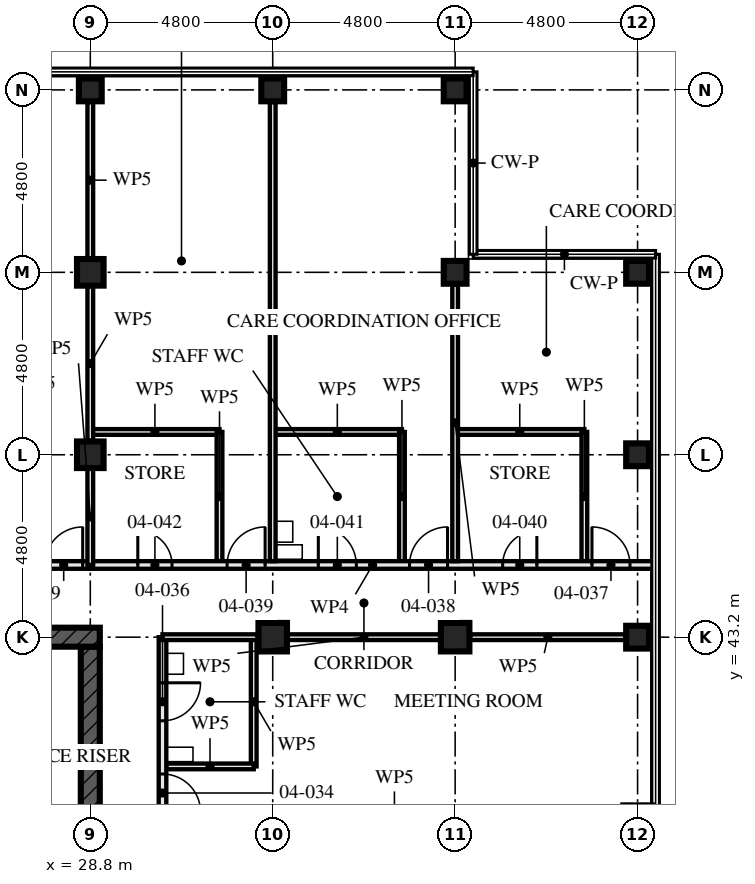
"""IFC4 building model, lengths in metres.
Left out: names, types, materials, properties, quantities, classifications, styles, units other than length and angle.
Written with IfcOpenShell. Run it as: python <this file> out.ifc"""

import sys

from ifc_helpers import new_model, si_unit, direction, frame, frame_2d, origin, origin_2d, place, context, subcontext, project, spatial, rectangle, hollow_rectangle, extrude, element, fill, save


model = new_model("IFC4")
c1 = context("Model", 3, precision=1e-05, world=origin(), true_north=direction((0.0, 1.0)))
c2 = subcontext(c1, "Body", "Model", "MODEL_VIEW")
j1 = project(units=[si_unit("LENGTHUNIT", "METRE"), si_unit("PLANEANGLEUNIT", "RADIAN")], contexts=[c1])
p1 = place(None, origin())
s1 = spatial("IfcSite", under=j1, at=p1, CompositionType="ELEMENT")
p2 = place(p1, origin())
s2 = spatial("IfcBuilding", under=s1, at=p2, CompositionType="ELEMENT")
p3 = place(p2, frame((0.0, 0.0, 18.0)))
s3 = spatial("IfcBuildingStorey", under=s2, at=p3, CompositionType="ELEMENT", Elevation=18.0)
for number, where, z_axis, x_axis in (
    (1, (28.8, 48.0, 0.0), (0.0, 0.0, 1.0), (1.0, 0.0, 0.0)),
    (2, (28.8, 52.8, 0.0), (0.0, 0.0, 1.0), (1.0, 0.0, 0.0)),
):
    element("IfcColumn", number, at=place(p3, frame(where, z_axis=z_axis, x_axis=x_axis)), inside=s3, PredefinedType="COLUMN", context=c2, shape_type="SweptSolid", body=[
        extrude(hollow_rectangle(XDim=0.7, YDim=0.7, WallThickness=0.06, at=origin_2d()), origin(), (0.0, 0.0, 1.0), 4.5),
    ])
p4 = place(p3, frame((28.8, 57.6, 0.0), z_axis=(0.0, 0.0, 1.0), x_axis=(0.0, 1.0, 0.0)))
e3 = element("IfcColumn", 3, at=p4, inside=s3, PredefinedType="COLUMN", context=c2, shape_type="SweptSolid", body=[
    extrude(hollow_rectangle(XDim=0.6, YDim=0.6, WallThickness=0.08, at=origin_2d()), origin(), (0.0, 0.0, 1.0), 4.5),
])
p5 = place(p3, frame((33.6, 43.2, 0.0), z_axis=(0.0, 0.0, 1.0), x_axis=(0.0, 1.0, 0.0)))
e4 = element("IfcColumn", 4, at=p5, inside=s3, PredefinedType="COLUMN", context=c2, shape_type="SweptSolid", body=[
    extrude(hollow_rectangle(XDim=0.75, YDim=0.75, WallThickness=0.08, at=origin_2d()), origin(), (0.0, 0.0, 1.0), 4.5),
])
p6 = place(p3, frame((33.6, 57.6, 0.0), z_axis=(0.0, 0.0, 1.0), x_axis=(0.0, 1.0, 0.0)))
e5 = element("IfcColumn", 5, at=p6, inside=s3, PredefinedType="COLUMN", context=c2, shape_type="SweptSolid", body=[
    extrude(hollow_rectangle(XDim=0.6, YDim=0.6, WallThickness=0.08, at=origin_2d()), origin(), (0.0, 0.0, 1.0), 4.5),
])
p7 = place(p3, frame((38.4, 43.2, 0.0), z_axis=(0.0, 0.0, 1.0), x_axis=(0.0, 1.0, 0.0)))
e6 = element("IfcColumn", 6, at=p7, inside=s3, PredefinedType="COLUMN", context=c2, shape_type="SweptSolid", body=[
    extrude(hollow_rectangle(XDim=0.75, YDim=0.75, WallThickness=0.08, at=origin_2d()), origin(), (0.0, 0.0, 1.0), 4.5),
])
for number, where, z_axis, x_axis in (
    (7, (38.4, 52.8, 0.0), (0.0, 0.0, 1.0), (0.0, 1.0, 0.0)),
    (8, (38.4, 57.6, 0.0), (0.0, 0.0, 1.0), (0.0, 1.0, 0.0)),
):
    element("IfcColumn", number, at=place(p3, frame(where, z_axis=z_axis, x_axis=x_axis)), inside=s3, PredefinedType="COLUMN", context=c2, shape_type="SweptSolid", body=[
        extrude(hollow_rectangle(XDim=0.6, YDim=0.6, WallThickness=0.06, at=origin_2d()), origin(), (0.0, 0.0, 1.0), 4.5),
    ])
for number, where, z_axis, x_axis in (
    (9, (43.2, 43.2, 0.0), (0.0, 0.0, 1.0), (0.0, 1.0, 0.0)),
    (10, (43.2, 48.0, 0.0), (0.0, 0.0, 1.0), (1.0, 0.0, 0.0)),
):
    element("IfcColumn", number, at=place(p3, frame(where, z_axis=z_axis, x_axis=x_axis)), inside=s3, PredefinedType="COLUMN", context=c2, shape_type="SweptSolid", body=[
        extrude(hollow_rectangle(XDim=0.6, YDim=0.6, WallThickness=0.08, at=origin_2d()), origin(), (0.0, 0.0, 1.0), 4.5),
    ])
p8 = place(p3, frame((43.2, 52.8, 0.0), z_axis=(0.0, 0.0, 1.0), x_axis=(0.0, 1.0, 0.0)))
e11 = element("IfcColumn", 11, at=p8, inside=s3, PredefinedType="COLUMN", context=c2, shape_type="SweptSolid", body=[
    extrude(hollow_rectangle(XDim=0.6, YDim=0.6, WallThickness=0.06, at=origin_2d()), origin(), (0.0, 0.0, 1.0), 4.5),
])
p9 = place(p3, frame((29.05, 43.2, -0.17), z_axis=(0.0, 0.0, 1.0), x_axis=(-1.0, 0.0, 0.0)))
e12 = element("IfcWall", 12, at=p9, inside=s3, PredefinedType="SHEAR", context=c2, shape_type="SweptSolid", body=[
    extrude(rectangle(XDim=14.9, YDim=0.5, at=frame_2d((7.45, 0.0))), origin(), (0.0, 0.0, 1.0), 4.5),
])
p10 = place(p9, frame((6.85, 0.0, 0.17)))
e13 = element("IfcOpeningElement", 13, at=p10, cuts=e12, PredefinedType="OPENING", context=c2, shape_type="SweptSolid", body=[
    extrude(rectangle(XDim=1.2, YDim=2.1, at=frame_2d((0.6, 1.05))), frame((0.0, 0.26, 0.0), z_axis=(0.0, -1.0, 0.0), x_axis=(1.0, 0.0, 0.0)), (0.0, 0.0, 1.0), 0.521),
])
p11 = place(p3, frame((28.8, 29.05, -0.17), z_axis=(0.0, 0.0, 1.0), x_axis=(0.0, 1.0, 0.0)))
e14 = element("IfcWall", 14, at=p11, inside=s3, PredefinedType="SHEAR", context=c2, shape_type="SweptSolid", body=[
    extrude(rectangle(XDim=13.9, YDim=0.5, at=frame_2d((6.95, 0.0))), origin(), (0.0, 0.0, 1.0), 4.5),
])
p12 = place(p11, frame((6.35, 0.0, 0.17)))
e15 = element("IfcOpeningElement", 15, at=p12, cuts=e14, PredefinedType="OPENING", context=c2, shape_type="SweptSolid", body=[
    extrude(rectangle(XDim=1.2, YDim=2.1, at=frame_2d((0.6, 1.05))), frame((0.0, 0.26, 0.0), z_axis=(0.0, -1.0, 0.0), x_axis=(1.0, 0.0, 0.0)), (0.0, 0.0, 1.0), 0.521),
])
p13 = place(p3, frame((28.8, 45.1, 0.0), z_axis=(0.0, 0.0, 1.0), x_axis=(-1.0, 0.0, 0.0)))
e16 = element("IfcWall", 16, at=p13, inside=s3, PredefinedType="PARTITIONING", context=c2, shape_type="SweptSolid", body=[
    extrude(rectangle(XDim=14.4, YDim=0.2, at=frame_2d((7.2, 0.0))), origin(), (0.0, 0.0, 1.0), 4.33),
])
p14 = place(p13, frame((0.2, 0.0, 0.0)))
e17 = element("IfcOpeningElement", 17, at=p14, cuts=e16, PredefinedType="OPENING", context=c2, shape_type="SweptSolid", body=[
    extrude(rectangle(XDim=1.0, YDim=2.4, at=frame_2d((0.5, 1.2))), frame((0.0, 0.111, 0.0), z_axis=(0.0, -1.0, 0.0), x_axis=(1.0, 0.0, 0.0)), (0.0, 0.0, 1.0), 0.221),
])
p15 = place(p13, frame((5.0, 0.0, 0.0)))
e18 = element("IfcOpeningElement", 18, at=p15, cuts=e16, PredefinedType="OPENING", context=c2, shape_type="SweptSolid", body=[
    extrude(rectangle(XDim=1.0, YDim=2.4, at=frame_2d((0.5, 1.2))), frame((0.0, 0.111, 0.0), z_axis=(0.0, -1.0, 0.0), x_axis=(1.0, 0.0, 0.0)), (0.0, 0.0, 1.0), 0.221),
])
p16 = place(p13, frame((9.8, 0.0, 0.0)))
e19 = element("IfcOpeningElement", 19, at=p16, cuts=e16, PredefinedType="OPENING", context=c2, shape_type="SweptSolid", body=[
    extrude(rectangle(XDim=1.0, YDim=2.4, at=frame_2d((0.5, 1.2))), frame((0.0, 0.111, 0.0), z_axis=(0.0, -1.0, 0.0), x_axis=(1.0, 0.0, 0.0)), (0.0, 0.0, 1.0), 0.221),
])
p17 = place(p13, frame((2.65, 0.0, 0.0)))
e20 = element("IfcOpeningElement", 20, at=p17, cuts=e16, PredefinedType="OPENING", context=c2, shape_type="SweptSolid", body=[
    extrude(rectangle(XDim=0.9, YDim=2.1, at=frame_2d((0.45, 1.05))), frame((0.0, 0.111, 0.0), z_axis=(0.0, -1.0, 0.0), x_axis=(1.0, 0.0, 0.0)), (0.0, 0.0, 1.0), 0.221),
])
p18 = place(p13, frame((7.4, 0.0, 0.0)))
e21 = element("IfcOpeningElement", 21, at=p18, cuts=e16, PredefinedType="OPENING", context=c2, shape_type="SweptSolid", body=[
    extrude(rectangle(XDim=1.0, YDim=2.1, at=frame_2d((0.5, 1.05))), frame((0.0, 0.111, 0.0), z_axis=(0.0, -1.0, 0.0), x_axis=(1.0, 0.0, 0.0)), (0.0, 0.0, 1.0), 0.221),
])
p19 = place(p13, frame((12.25, 0.0, 0.0)))
e22 = element("IfcOpeningElement", 22, at=p19, cuts=e16, PredefinedType="OPENING", context=c2, shape_type="SweptSolid", body=[
    extrude(rectangle(XDim=0.9, YDim=2.1, at=frame_2d((0.45, 1.05))), frame((0.0, 0.111, 0.0), z_axis=(0.0, -1.0, 0.0), x_axis=(1.0, 0.0, 0.0)), (0.0, 0.0, 1.0), 0.221),
])
p20 = place(p3, frame((33.1, 39.8, 0.0), z_axis=(0.0, 0.0, 1.0), x_axis=(-1.0, 0.0, 0.0)))
e23 = element("IfcWall", 23, at=p20, inside=s3, PredefinedType="PARTITIONING", context=c2, shape_type="SweptSolid", body=[
    extrude(rectangle(XDim=2.3, YDim=0.15, at=frame_2d((1.15, 0.0))), origin(), (0.0, 0.0, 1.0), 4.33),
])
p21 = place(p3, frame((33.1, 39.8, 0.0), z_axis=(0.0, 0.0, 1.0), x_axis=(0.0, 1.0, 0.0)))
e24 = element("IfcWall", 24, at=p21, inside=s3, PredefinedType="PARTITIONING", context=c2, shape_type="SweptSolid", body=[
    extrude(rectangle(XDim=3.4, YDim=0.15, at=frame_2d((1.7, 0.0))), origin(), (0.0, 0.0, 1.0), 4.33),
])
p22 = place(p3, frame((30.7, 28.8, 0.0), z_axis=(0.0, 0.0, 1.0), x_axis=(0.0, 1.0, 0.0)))
e25 = element("IfcWall", 25, at=p22, inside=s3, PredefinedType="PARTITIONING", context=c2, shape_type="SweptSolid", body=[
    extrude(rectangle(XDim=14.4, YDim=0.2, at=frame_2d((7.2, 0.0))), origin(), (0.0, 0.0, 1.0), 3.55),
])
p23 = place(p22, frame((1.4, 0.0, 0.0)))
e26 = element("IfcOpeningElement", 26, at=p23, cuts=e25, PredefinedType="OPENING", context=c2, shape_type="SweptSolid", body=[
    extrude(rectangle(XDim=1.0, YDim=2.1, at=frame_2d((0.5, 1.05))), frame((0.0, 0.111, 0.0), z_axis=(0.0, -1.0, 0.0), x_axis=(1.0, 0.0, 0.0)), (0.0, 0.0, 1.0), 0.221),
])
p24 = place(p22, frame((3.6, 0.0, 0.0)))
e27 = element("IfcOpeningElement", 27, at=p24, cuts=e25, PredefinedType="OPENING", context=c2, shape_type="SweptSolid", body=[
    extrude(rectangle(XDim=1.0, YDim=2.4, at=frame_2d((0.5, 1.2))), frame((0.0, 0.111, 0.0), z_axis=(0.0, -1.0, 0.0), x_axis=(1.0, 0.0, 0.0)), (0.0, 0.0, 1.0), 0.221),
])
p25 = place(p22, frame((5.0, 0.0, 0.0)))
e28 = element("IfcOpeningElement", 28, at=p25, cuts=e25, PredefinedType="OPENING", context=c2, shape_type="SweptSolid", body=[
    extrude(rectangle(XDim=1.0, YDim=2.4, at=frame_2d((0.5, 1.2))), frame((0.0, 0.111, 0.0), z_axis=(0.0, -1.0, 0.0), x_axis=(1.0, 0.0, 0.0)), (0.0, 0.0, 1.0), 0.221),
])
p26 = place(p22, frame((9.8, 0.0, 0.0)))
e29 = element("IfcOpeningElement", 29, at=p26, cuts=e25, PredefinedType="OPENING", context=c2, shape_type="SweptSolid", body=[
    extrude(rectangle(XDim=1.0, YDim=2.4, at=frame_2d((0.5, 1.2))), frame((0.0, 0.111, 0.0), z_axis=(0.0, -1.0, 0.0), x_axis=(1.0, 0.0, 0.0)), (0.0, 0.0, 1.0), 0.221),
])
p27 = place(p22, frame((7.45, 0.0, 0.0)))
e30 = element("IfcOpeningElement", 30, at=p27, cuts=e25, PredefinedType="OPENING", context=c2, shape_type="SweptSolid", body=[
    extrude(rectangle(XDim=0.9, YDim=2.1, at=frame_2d((0.45, 1.05))), frame((0.0, 0.111, 0.0), z_axis=(0.0, -1.0, 0.0), x_axis=(1.0, 0.0, 0.0)), (0.0, 0.0, 1.0), 0.221),
])
p28 = place(p22, frame((12.2, 0.0, 0.0)))
e31 = element("IfcOpeningElement", 31, at=p28, cuts=e25, PredefinedType="OPENING", context=c2, shape_type="SweptSolid", body=[
    extrude(rectangle(XDim=1.0, YDim=2.1, at=frame_2d((0.5, 1.05))), frame((0.0, 0.111, 0.0), z_axis=(0.0, -1.0, 0.0), x_axis=(1.0, 0.0, 0.0)), (0.0, 0.0, 1.0), 0.221),
])
p29 = place(p3, frame((41.8, 48.6, 0.0), z_axis=(0.0, 0.0, 1.0), x_axis=(0.0, -1.0, 0.0)))
e32 = element("IfcWall", 32, at=p29, inside=s3, PredefinedType="PARTITIONING", context=c2, shape_type="SweptSolid", body=[
    extrude(rectangle(XDim=3.4, YDim=0.15, at=frame_2d((1.7, 0.0))), origin(), (0.0, 0.0, 1.0), 3.55),
])
p30 = place(p3, frame((41.8, 48.6, 0.0), z_axis=(0.0, 0.0, 1.0), x_axis=(-1.0, 0.0, 0.0)))
e33 = element("IfcWall", 33, at=p30, inside=s3, PredefinedType="PARTITIONING", context=c2, shape_type="SweptSolid", body=[
    extrude(rectangle(XDim=3.4, YDim=0.15, at=frame_2d((1.7, 0.0))), origin(), (0.0, 0.0, 1.0), 4.33),
])
p31 = place(p3, frame((37.0, 48.6, 0.0), z_axis=(0.0, 0.0, 1.0), x_axis=(0.0, -1.0, 0.0)))
e34 = element("IfcWall", 34, at=p31, inside=s3, PredefinedType="PARTITIONING", context=c2, shape_type="SweptSolid", body=[
    extrude(rectangle(XDim=3.4, YDim=0.15, at=frame_2d((1.7, 0.0))), origin(), (0.0, 0.0, 1.0), 3.55),
])
p32 = place(p3, frame((37.0, 48.6, 0.0), z_axis=(0.0, 0.0, 1.0), x_axis=(-1.0, 0.0, 0.0)))
e35 = element("IfcWall", 35, at=p32, inside=s3, PredefinedType="PARTITIONING", context=c2, shape_type="SweptSolid", body=[
    extrude(rectangle(XDim=3.4, YDim=0.15, at=frame_2d((1.7, 0.0))), origin(), (0.0, 0.0, 1.0), 4.33),
])
p33 = place(p3, frame((32.2, 48.6, 0.0), z_axis=(0.0, 0.0, 1.0), x_axis=(0.0, -1.0, 0.0)))
e36 = element("IfcWall", 36, at=p33, inside=s3, PredefinedType="PARTITIONING", context=c2, shape_type="SweptSolid", body=[
    extrude(rectangle(XDim=3.4, YDim=0.15, at=frame_2d((1.7, 0.0))), origin(), (0.0, 0.0, 1.0), 3.55),
])
p34 = place(p3, frame((32.2, 48.6, 0.0), z_axis=(0.0, 0.0, 1.0), x_axis=(-1.0, 0.0, 0.0)))
e37 = element("IfcWall", 37, at=p34, inside=s3, PredefinedType="PARTITIONING", context=c2, shape_type="SweptSolid", body=[
    extrude(rectangle(XDim=3.4, YDim=0.15, at=frame_2d((1.7, 0.0))), origin(), (0.0, 0.0, 1.0), 4.33),
])
p35 = place(p3, frame((38.4, 52.48, 0.0), z_axis=(0.0, 0.0, 1.0), x_axis=(0.0, -1.0, 0.0)))
e38 = element("IfcWall", 38, at=p35, inside=s3, PredefinedType="PARTITIONING", context=c2, shape_type="SweptSolid", body=[
    extrude(rectangle(XDim=7.28, YDim=0.15, at=frame_2d((3.64, 0.0))), origin(), (0.0, 0.0, 1.0), 3.55),
])
p36 = place(p3, frame((33.6, 57.28, 0.0), z_axis=(0.0, 0.0, 1.0), x_axis=(0.0, -1.0, 0.0)))
e39 = element("IfcWall", 39, at=p36, inside=s3, PredefinedType="PARTITIONING", context=c2, shape_type="SweptSolid", body=[
    extrude(rectangle(XDim=12.08, YDim=0.15, at=frame_2d((6.04, 0.0))), origin(), (0.0, 0.0, 1.0), 3.55),
])
p37 = place(p3, frame((43.655, 45.1, 0.0), z_axis=(0.0, 0.0, 1.0), x_axis=(-1.0, 0.0, 0.0)))
e40 = element("IfcWall", 40, at=p37, inside=s3, PredefinedType="PARTITIONING", context=c2, shape_type="SweptSolid", body=[
    extrude(rectangle(XDim=14.855, YDim=0.2, at=frame_2d((7.427, 0.0))), origin(), (0.0, 0.0, 1.0), 3.32),
])
p38 = place(p37, frame((0.655, 0.0, 0.0)))
e41 = element("IfcOpeningElement", 41, at=p38, cuts=e40, PredefinedType="OPENING", context=c2, shape_type="SweptSolid", body=[
    extrude(rectangle(XDim=1.0, YDim=2.4, at=frame_2d((0.5, 1.2))), frame((0.0, 0.111, 0.0), z_axis=(0.0, -1.0, 0.0), x_axis=(1.0, 0.0, 0.0)), (0.0, 0.0, 1.0), 0.221),
])
p39 = place(p37, frame((5.455, 0.0, 0.0)))
e42 = element("IfcOpeningElement", 42, at=p39, cuts=e40, PredefinedType="OPENING", context=c2, shape_type="SweptSolid", body=[
    extrude(rectangle(XDim=1.0, YDim=2.4, at=frame_2d((0.5, 1.2))), frame((0.0, 0.111, 0.0), z_axis=(0.0, -1.0, 0.0), x_axis=(1.0, 0.0, 0.0)), (0.0, 0.0, 1.0), 0.221),
])
p40 = place(p37, frame((10.255, 0.0, 0.0)))
e43 = element("IfcOpeningElement", 43, at=p40, cuts=e40, PredefinedType="OPENING", context=c2, shape_type="SweptSolid", body=[
    extrude(rectangle(XDim=1.0, YDim=2.4, at=frame_2d((0.5, 1.2))), frame((0.0, 0.111, 0.0), z_axis=(0.0, -1.0, 0.0), x_axis=(1.0, 0.0, 0.0)), (0.0, 0.0, 1.0), 0.221),
])
p41 = place(p37, frame((3.105, 0.0, 0.0)))
e44 = element("IfcOpeningElement", 44, at=p41, cuts=e40, PredefinedType="OPENING", context=c2, shape_type="SweptSolid", body=[
    extrude(rectangle(XDim=0.9, YDim=2.1, at=frame_2d((0.45, 1.05))), frame((0.0, 0.111, 0.0), z_axis=(0.0, -1.0, 0.0), x_axis=(1.0, 0.0, 0.0)), (0.0, 0.0, 1.0), 0.221),
])
p42 = place(p37, frame((7.855, 0.0, 0.0)))
e45 = element("IfcOpeningElement", 45, at=p42, cuts=e40, PredefinedType="OPENING", context=c2, shape_type="SweptSolid", body=[
    extrude(rectangle(XDim=1.0, YDim=2.1, at=frame_2d((0.5, 1.05))), frame((0.0, 0.111, 0.0), z_axis=(0.0, -1.0, 0.0), x_axis=(1.0, 0.0, 0.0)), (0.0, 0.0, 1.0), 0.221),
])
p43 = place(p37, frame((12.705, 0.0, 0.0)))
e46 = element("IfcOpeningElement", 46, at=p43, cuts=e40, PredefinedType="OPENING", context=c2, shape_type="SweptSolid", body=[
    extrude(rectangle(XDim=0.9, YDim=2.1, at=frame_2d((0.45, 1.05))), frame((0.0, 0.111, 0.0), z_axis=(0.0, -1.0, 0.0), x_axis=(1.0, 0.0, 0.0)), (0.0, 0.0, 1.0), 0.221),
])
p44 = place(p3, frame((28.8, 45.1, 0.0), z_axis=(0.0, 0.0, 1.0), x_axis=(0.0, 1.0, 0.0)))
e47 = element("IfcWall", 47, at=p44, inside=s3, PredefinedType="PARTITIONING", context=c2, shape_type="SweptSolid", body=[
    extrude(rectangle(XDim=2.53, YDim=0.15, at=frame_2d((1.265, 0.0))), origin(), (0.0, 0.0, 1.0), 3.32),
])
p45 = place(p3, frame((28.8, 48.37, 0.0), z_axis=(0.0, 0.0, 1.0), x_axis=(0.0, 1.0, 0.0)))
e48 = element("IfcWall", 48, at=p45, inside=s3, PredefinedType="PARTITIONING", context=c2, shape_type="SweptSolid", body=[
    extrude(rectangle(XDim=4.06, YDim=0.15, at=frame_2d((2.03, 0.0))), origin(), (0.0, 0.0, 1.0), 3.32),
])
p46 = place(p3, frame((28.8, 53.17, 0.0), z_axis=(0.0, 0.0, 1.0), x_axis=(0.0, 1.0, 0.0)))
e49 = element("IfcWall", 49, at=p46, inside=s3, PredefinedType="PARTITIONING", context=c2, shape_type="SweptSolid", body=[
    extrude(rectangle(XDim=4.11, YDim=0.15, at=frame_2d((2.055, 0.0))), origin(), (0.0, 0.0, 1.0), 3.32),
])
p47 = place(p3, frame((42.88, 43.2, 0.0), z_axis=(0.0, 0.0, 1.0), x_axis=(-1.0, 0.0, 0.0)))
e50 = element("IfcWall", 50, at=p47, inside=s3, PredefinedType="PARTITIONING", context=c2, shape_type="SweptSolid", body=[
    extrude(rectangle(XDim=4.085, YDim=0.15, at=frame_2d((2.042, 0.0))), origin(), (0.0, 0.0, 1.0), 3.32),
])
p48 = place(p3, frame((38.005, 43.2, 0.0), z_axis=(0.0, 0.0, 1.0), x_axis=(-1.0, 0.0, 0.0)))
e51 = element("IfcWall", 51, at=p48, inside=s3, PredefinedType="PARTITIONING", context=c2, shape_type="SweptSolid", body=[
    extrude(rectangle(XDim=4.01, YDim=0.15, at=frame_2d((2.005, 0.0))), origin(), (0.0, 0.0, 1.0), 3.32),
])
p49 = place(p3, frame((33.205, 43.2, 0.0), z_axis=(0.0, 0.0, 1.0), x_axis=(-1.0, 0.0, 0.0)))
e52 = element("IfcWall", 52, at=p49, inside=s3, PredefinedType="PARTITIONING", context=c2, shape_type="SweptSolid", body=[
    extrude(rectangle(XDim=2.505, YDim=0.15, at=frame_2d((1.252, 0.0))), origin(), (0.0, 0.0, 1.0), 3.32),
])
p50 = place(p14, frame((1.0, 0.0, 0.0), z_axis=(0.0, 0.0, 1.0), x_axis=(-1.0, 0.0, 0.0)))
e53 = element("IfcDoor", 53, at=p50, inside=s3, OperationType="SINGLE_SWING_LEFT", PredefinedType="DOOR", context=c2, shape_type="SweptSolid", body=[
    extrude(rectangle(XDim=1.0, YDim=2.4, at=frame_2d((0.5, 1.2))), frame((0.0, 0.027, 0.0), z_axis=(0.0, -1.0, 0.0), x_axis=(1.0, 0.0, 0.0)), (0.0, 0.0, 1.0), 0.054),
])
fill(e17, e53)
p51 = place(p26, frame((1.0, 0.0, 0.0), z_axis=(0.0, 0.0, 1.0), x_axis=(-1.0, 0.0, 0.0)))
e54 = element("IfcDoor", 54, at=p51, inside=s3, OperationType="SINGLE_SWING_LEFT", PredefinedType="DOOR", context=c2, shape_type="SweptSolid", body=[
    extrude(rectangle(XDim=1.0, YDim=2.4, at=frame_2d((0.5, 1.2))), frame((0.0, 0.027, 0.0), z_axis=(0.0, -1.0, 0.0), x_axis=(1.0, 0.0, 0.0)), (0.0, 0.0, 1.0), 0.054),
])
fill(e29, e54)
p52 = place(p28, frame((1.0, 0.0, 0.0), z_axis=(0.0, 0.0, 1.0), x_axis=(-1.0, 0.0, 0.0)))
e55 = element("IfcDoor", 55, at=p52, inside=s3, OperationType="SINGLE_SWING_RIGHT", PredefinedType="DOOR", context=c2, shape_type="SweptSolid", body=[
    extrude(rectangle(XDim=1.0, YDim=2.1, at=frame_2d((0.5, 1.05))), frame((0.0, 0.027, 0.0), z_axis=(0.0, -1.0, 0.0), x_axis=(1.0, 0.0, 0.0)), (0.0, 0.0, 1.0), 0.054),
])
fill(e31, e55)
p53 = place(p38, frame((1.0, 0.0, 0.0), z_axis=(0.0, 0.0, 1.0), x_axis=(-1.0, 0.0, 0.0)))
e56 = element("IfcDoor", 56, at=p53, inside=s3, OperationType="SINGLE_SWING_RIGHT", PredefinedType="DOOR", context=c2, shape_type="SweptSolid", body=[
    extrude(rectangle(XDim=1.0, YDim=2.4, at=frame_2d((0.5, 1.2))), frame((0.0, 0.027, 0.0), z_axis=(0.0, -1.0, 0.0), x_axis=(1.0, 0.0, 0.0)), (0.0, 0.0, 1.0), 0.054),
])
fill(e41, e56)
p54 = place(p39, frame((1.0, 0.0, 0.0), z_axis=(0.0, 0.0, 1.0), x_axis=(-1.0, 0.0, 0.0)))
e57 = element("IfcDoor", 57, at=p54, inside=s3, OperationType="SINGLE_SWING_LEFT", PredefinedType="DOOR", context=c2, shape_type="SweptSolid", body=[
    extrude(rectangle(XDim=1.0, YDim=2.4, at=frame_2d((0.5, 1.2))), frame((0.0, 0.027, 0.0), z_axis=(0.0, -1.0, 0.0), x_axis=(1.0, 0.0, 0.0)), (0.0, 0.0, 1.0), 0.054),
])
fill(e42, e57)
p55 = place(p40, frame((1.0, 0.0, 0.0), z_axis=(0.0, 0.0, 1.0), x_axis=(-1.0, 0.0, 0.0)))
e58 = element("IfcDoor", 58, at=p55, inside=s3, OperationType="SINGLE_SWING_LEFT", PredefinedType="DOOR", context=c2, shape_type="SweptSolid", body=[
    extrude(rectangle(XDim=1.0, YDim=2.4, at=frame_2d((0.5, 1.2))), frame((0.0, 0.027, 0.0), z_axis=(0.0, -1.0, 0.0), x_axis=(1.0, 0.0, 0.0)), (0.0, 0.0, 1.0), 0.054),
])
fill(e43, e58)
p56 = place(p41, frame((0.9, 0.0, 0.0), z_axis=(0.0, 0.0, 1.0), x_axis=(-1.0, 0.0, 0.0)))
e59 = element("IfcDoor", 59, at=p56, inside=s3, OperationType="SINGLE_SWING_LEFT", PredefinedType="DOOR", context=c2, shape_type="SweptSolid", body=[
    extrude(rectangle(XDim=0.9, YDim=2.1, at=frame_2d((0.45, 1.05))), frame((0.0, 0.027, 0.0), z_axis=(0.0, -1.0, 0.0), x_axis=(1.0, 0.0, 0.0)), (0.0, 0.0, 1.0), 0.054),
])
fill(e44, e59)
p57 = place(p42, frame((1.0, 0.0, 0.0), z_axis=(0.0, 0.0, 1.0), x_axis=(-1.0, 0.0, 0.0)))
e60 = element("IfcDoor", 60, at=p57, inside=s3, OperationType="SINGLE_SWING_RIGHT", PredefinedType="DOOR", context=c2, shape_type="SweptSolid", body=[
    extrude(rectangle(XDim=1.0, YDim=2.1, at=frame_2d((0.5, 1.05))), frame((0.0, 0.027, 0.0), z_axis=(0.0, -1.0, 0.0), x_axis=(1.0, 0.0, 0.0)), (0.0, 0.0, 1.0), 0.054),
])
fill(e45, e60)
p58 = place(p43, frame((0.9, 0.0, 0.0), z_axis=(0.0, 0.0, 1.0), x_axis=(-1.0, 0.0, 0.0)))
e61 = element("IfcDoor", 61, at=p58, inside=s3, OperationType="SINGLE_SWING_RIGHT", PredefinedType="DOOR", context=c2, shape_type="SweptSolid", body=[
    extrude(rectangle(XDim=0.9, YDim=2.1, at=frame_2d((0.45, 1.05))), frame((0.0, 0.027, 0.0), z_axis=(0.0, -1.0, 0.0), x_axis=(1.0, 0.0, 0.0)), (0.0, 0.0, 1.0), 0.054),
])
fill(e46, e61)
save(model, sys.argv[1])
